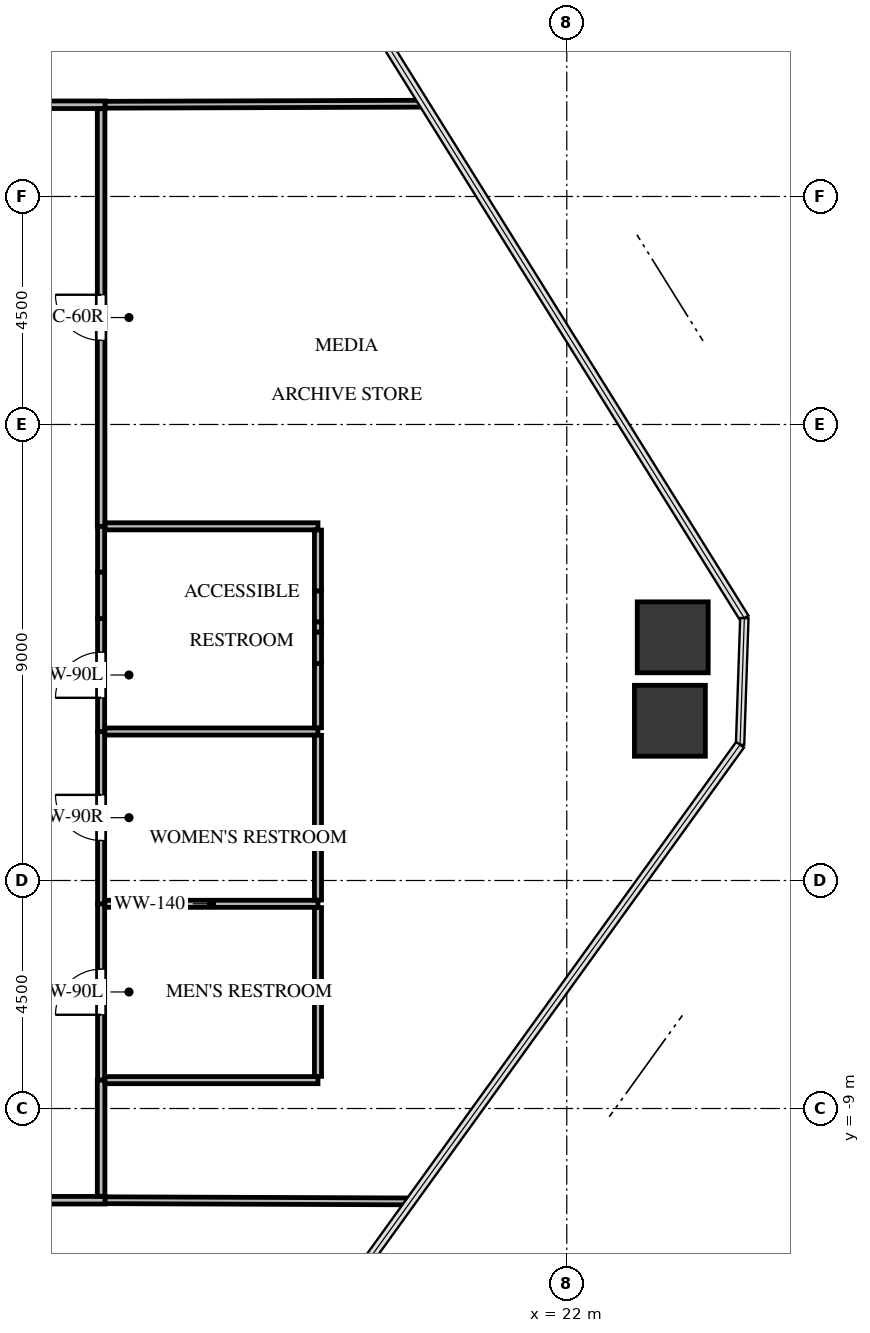
"""IFC4 building model, lengths in metres.
Left out: names, types, materials, properties, quantities, classifications, styles, units other than length and angle.
Written with IfcOpenShell. Run it as: python <this file> out.ifc"""

import sys

from ifc_helpers import new_model, si_unit, direction, frame, frame_2d, origin, origin_2d, place, context, subcontext, project, spatial, rectangle, extrude, source, transform, mapped, element, fill, save


model = new_model("IFC4")
c1 = context("Model", 3, precision=1e-05, world=origin(), true_north=direction((0.0, 1.0)))
c2 = subcontext(c1, "Body", "Model", "MODEL_VIEW")
j1 = project(units=[si_unit("LENGTHUNIT", "METRE"), si_unit("PLANEANGLEUNIT", "RADIAN")], contexts=[c1])
p1 = place(None, origin())
s1 = spatial("IfcSite", under=j1, at=p1, CompositionType="ELEMENT")
p2 = place(p1, origin())
s2 = spatial("IfcBuilding", under=s1, at=p2, CompositionType="ELEMENT")
p3 = place(p2, frame((0.0, 0.0, 35.7)))
s3 = spatial("IfcBuildingStorey", under=s2, at=p3, CompositionType="ELEMENT", Elevation=35.7)
m1 = source(origin(), c2, "Body", "SweptSolid", [
    extrude(rectangle(XDim=1.4, YDim=1.4, at=origin_2d()), origin(), (0.0, 0.0, 1.0), 3.3),
])
for number, where, z_axis, x_axis in (
    (1, (24.091, 0.3, -0.24), (0.0, 0.0, 1.0), (1.0, 0.0, 0.0)),
    (2, (24.035, -1.347, -0.24), (0.0, 0.0, 1.0), (1.0, 0.0, 0.0)),
):
    element("IfcColumn", number, at=place(p3, frame(where, z_axis=z_axis, x_axis=x_axis)), inside=s3, PredefinedType="COLUMN", context=c2, shape_type="MappedRepresentation", body=[
        mapped(m1, transform((0.0, 0.0, 0.0), x_axis=(1.0, 0.0, 0.0), y_axis=(0.0, 1.0, 0.0), z_axis=(0.0, 0.0, 1.0), scale=1.0)),
    ])
p4 = place(p3, frame((12.81, -8.44, 0.0), z_axis=(0.0, 0.0, 1.0), x_axis=(0.0, 1.0, 0.0)))
e3 = element("IfcWall", 3, at=p4, inside=s3, PredefinedType="PARTITIONING", context=c2, shape_type="SweptSolid", body=[
    extrude(rectangle(XDim=3.48, YDim=0.14, at=frame_2d((1.74, 0.0))), origin(), (0.0, 0.0, 1.0), 3.045),
])
p5 = place(p4, frame((1.29, 0.0, 0.0)))
e4 = element("IfcOpeningElement", 4, at=p5, cuts=e3, PredefinedType="OPENING", context=c2, shape_type="SweptSolid", body=[
    extrude(rectangle(XDim=0.9, YDim=2.05, at=frame_2d((0.45, 1.025))), frame((0.0, 0.08, 0.0), z_axis=(0.0, -1.0, 0.0), x_axis=(1.0, 0.0, 0.0)), (0.0, 0.0, 1.0), 0.16),
])
p6 = place(p3, frame((12.81, -4.96, 0.0), z_axis=(0.0, 0.0, 1.0), x_axis=(0.0, 1.0, 0.0)))
e5 = element("IfcWall", 5, at=p6, inside=s3, PredefinedType="PARTITIONING", context=c2, shape_type="SweptSolid", body=[
    extrude(rectangle(XDim=3.4, YDim=0.14, at=frame_2d((1.7, 0.0))), origin(), (0.0, 0.0, 1.0), 3.045),
])
p7 = place(p6, frame((1.25, 0.0, 0.0)))
e6 = element("IfcOpeningElement", 6, at=p7, cuts=e5, PredefinedType="OPENING", context=c2, shape_type="SweptSolid", body=[
    extrude(rectangle(XDim=0.9, YDim=2.05, at=frame_2d((0.45, 1.025))), frame((0.0, 0.08, 0.0), z_axis=(0.0, -1.0, 0.0), x_axis=(1.0, 0.0, 0.0)), (0.0, 0.0, 1.0), 0.16),
])
p8 = place(p3, frame((12.81, -1.56, 0.0), z_axis=(0.0, 0.0, 1.0), x_axis=(0.0, 1.0, 0.0)))
e7 = element("IfcWall", 7, at=p8, inside=s3, PredefinedType="PARTITIONING", context=c2, shape_type="SweptSolid", body=[
    extrude(rectangle(XDim=2.231, YDim=0.14, at=frame_2d((1.116, 0.0))), origin(), (0.0, 0.0, 1.0), 3.045),
])
p9 = place(p8, frame((0.666, 0.0, 0.0)))
e8 = element("IfcOpeningElement", 8, at=p9, cuts=e7, PredefinedType="OPENING", context=c2, shape_type="SweptSolid", body=[
    extrude(rectangle(XDim=0.9, YDim=2.05, at=frame_2d((0.45, 1.025))), frame((0.0, 0.08, 0.0), z_axis=(0.0, -1.0, 0.0), x_axis=(1.0, 0.0, 0.0)), (0.0, 0.0, 1.0), 0.16),
])
p10 = place(p3, frame((12.81, 1.585, 0.0), z_axis=(0.0, 0.0, 1.0), x_axis=(0.0, 1.0, 0.0)))
e9 = element("IfcWall", 9, at=p10, inside=s3, PredefinedType="PARTITIONING", context=c2, shape_type="SweptSolid", body=[
    extrude(rectangle(XDim=0.905, YDim=0.14, at=frame_2d((0.453, 0.0))), origin(), (0.0, 0.0, 1.0), 3.045),
])
p11 = place(p3, frame((12.81, 0.671, 0.0), z_axis=(0.0, 0.0, 1.0), x_axis=(0.0, 1.0, 0.0)))
e10 = element("IfcWall", 10, at=p11, inside=s3, PredefinedType="PARTITIONING", context=c2, shape_type="SweptSolid", body=[
    extrude(rectangle(XDim=0.914, YDim=0.14, at=frame_2d((0.457, 0.0))), origin(), (0.0, 0.0, 1.0), 2.13),
])
p12 = place(p3, frame((12.89, 10.81, 0.0), z_axis=(0.0, 0.0, 1.0), x_axis=(-1.0, 0.0, 0.0)))
e11 = element("IfcWall", 11, at=p12, inside=s3, PredefinedType="PARTITIONING", context=c2, shape_type="SweptSolid", body=[
    extrude(rectangle(XDim=1.847, YDim=0.15, at=frame_2d((0.924, 0.0))), origin(), (0.0, 0.0, 1.0), 3.045),
])
p13 = place(p3, frame((5.817, -10.81, 0.0), z_axis=(0.0, 0.0, 1.0), x_axis=(1.0, 0.0, 0.0)))
e12 = element("IfcWall", 12, at=p13, inside=s3, PredefinedType="PARTITIONING", context=c2, shape_type="SweptSolid", body=[
    extrude(rectangle(XDim=7.073, YDim=0.15, at=frame_2d((3.536, 0.0))), origin(), (0.0, 0.0, 1.0), 2.13),
])
p14 = place(p3, frame((12.81, 2.49, 0.0), z_axis=(0.0, 0.0, 1.0), x_axis=(0.0, 1.0, 0.0)))
e13 = element("IfcWall", 13, at=p14, inside=s3, PredefinedType="PARTITIONING", context=c2, shape_type="SweptSolid", body=[
    extrude(rectangle(XDim=8.241, YDim=0.15, at=frame_2d((4.121, 0.0))), origin(), (0.0, 0.0, 1.0), 3.045),
])
p15 = place(p14, frame((3.67, 0.0, 0.0)))
e14 = element("IfcOpeningElement", 14, at=p15, cuts=e13, PredefinedType="OPENING", context=c2, shape_type="SweptSolid", body=[
    extrude(rectangle(XDim=0.9, YDim=2.05, at=frame_2d((0.45, 1.025))), frame((0.0, 0.085, 0.0), z_axis=(0.0, -1.0, 0.0), x_axis=(1.0, 0.0, 0.0)), (0.0, 0.0, 1.0), 0.17),
])
p16 = place(p3, frame((12.81, -10.731, 0.0), z_axis=(0.0, 0.0, 1.0), x_axis=(0.0, 1.0, 0.0)))
e15 = element("IfcWall", 15, at=p16, inside=s3, PredefinedType="PARTITIONING", context=c2, shape_type="SweptSolid", body=[
    extrude(rectangle(XDim=2.291, YDim=0.15, at=frame_2d((1.146, 0.0))), origin(), (0.0, 0.0, 1.0), 3.045),
])
p17 = place(p3, frame((12.884, -4.96, 0.0), z_axis=(0.0, 0.0, 1.0), x_axis=(1.0, 0.0, 0.0)))
e16 = element("IfcWall", 16, at=p17, inside=s3, PredefinedType="PARTITIONING", context=c2, shape_type="SweptSolid", body=[
    extrude(rectangle(XDim=4.206, YDim=0.14, at=frame_2d((2.103, 0.0))), origin(), (0.0, 0.0, 1.0), 3.045),
])
p18 = place(p3, frame((17.09, -8.44, 0.0), z_axis=(0.0, 0.0, 1.0), x_axis=(-1.0, 0.0, 0.0)))
e17 = element("IfcWall", 17, at=p18, inside=s3, PredefinedType="PARTITIONING", context=c2, shape_type="SweptSolid", body=[
    extrude(rectangle(XDim=4.201, YDim=0.14, at=frame_2d((2.101, 0.0))), origin(), (0.0, 0.0, 1.0), 3.045),
])
p19 = place(p3, frame((17.09, -5.034, 0.0), z_axis=(0.0, 0.0, 1.0), x_axis=(0.0, -1.0, 0.0)))
e18 = element("IfcWall", 18, at=p19, inside=s3, PredefinedType="PARTITIONING", context=c2, shape_type="SweptSolid", body=[
    extrude(rectangle(XDim=3.332, YDim=0.14, at=frame_2d((1.666, 0.0))), origin(), (0.0, 0.0, 1.0), 3.045),
])
p20 = place(p3, frame((12.884, -1.56, 0.0), z_axis=(0.0, 0.0, 1.0), x_axis=(1.0, 0.0, 0.0)))
e19 = element("IfcWall", 19, at=p20, inside=s3, PredefinedType="PARTITIONING", context=c2, shape_type="SweptSolid", body=[
    extrude(rectangle(XDim=4.206, YDim=0.14, at=frame_2d((2.103, 0.0))), origin(), (0.0, 0.0, 1.0), 3.045),
])
p21 = place(p3, frame((17.09, -1.634, 0.0), z_axis=(0.0, 0.0, 1.0), x_axis=(0.0, -1.0, 0.0)))
e20 = element("IfcWall", 20, at=p21, inside=s3, PredefinedType="PARTITIONING", context=c2, shape_type="SweptSolid", body=[
    extrude(rectangle(XDim=3.252, YDim=0.14, at=frame_2d((1.626, 0.0))), origin(), (0.0, 0.0, 1.0), 3.045),
])
p22 = place(p3, frame((12.889, 2.49, 0.0), z_axis=(0.0, 0.0, 1.0), x_axis=(1.0, 0.0, 0.0)))
e21 = element("IfcWall", 21, at=p22, inside=s3, PredefinedType="PARTITIONING", context=c2, shape_type="SweptSolid", body=[
    extrude(rectangle(XDim=4.201, YDim=0.14, at=frame_2d((2.101, 0.0))), origin(), (0.0, 0.0, 1.0), 3.045),
])
p23 = place(p3, frame((17.09, 2.416, 0.0), z_axis=(0.0, 0.0, 1.0), x_axis=(0.0, -1.0, 0.0)))
e22 = element("IfcWall", 22, at=p23, inside=s3, PredefinedType="PARTITIONING", context=c2, shape_type="SweptSolid", body=[
    extrude(rectangle(XDim=1.204, YDim=0.14, at=frame_2d((0.602, 0.0))), origin(), (0.0, 0.0, 1.0), 3.045),
])
p24 = place(p3, frame((17.09, 0.606, 0.0), z_axis=(0.0, 0.0, 1.0), x_axis=(0.0, -1.0, 0.0)))
e23 = element("IfcWall", 23, at=p24, inside=s3, PredefinedType="PARTITIONING", context=c2, shape_type="SweptSolid", body=[
    extrude(rectangle(XDim=0.205, YDim=0.14, at=frame_2d((0.103, 0.0))), origin(), (0.0, 0.0, 1.0), 3.045),
])
p25 = place(p3, frame((17.09, -0.216, 0.0), z_axis=(0.0, 0.0, 1.0), x_axis=(0.0, -1.0, 0.0)))
e24 = element("IfcWall", 24, at=p25, inside=s3, PredefinedType="PARTITIONING", context=c2, shape_type="SweptSolid", body=[
    extrude(rectangle(XDim=1.27, YDim=0.14, at=frame_2d((0.635, 0.0))), origin(), (0.0, 0.0, 1.0), 3.045),
])
p26 = place(p3, frame((17.09, 1.212, 0.0), z_axis=(0.0, 0.0, 1.0), x_axis=(0.0, -1.0, 0.0)))
e25 = element("IfcWall", 25, at=p26, inside=s3, PredefinedType="PARTITIONING", context=c2, shape_type="SweptSolid", body=[
    extrude(rectangle(XDim=0.606, YDim=0.14, at=frame_2d((0.303, 0.0))), origin(), (0.0, 0.0, 1.0), 2.13),
])
p27 = place(p3, frame((17.09, 0.401, 0.0), z_axis=(0.0, 0.0, 1.0), x_axis=(0.0, -1.0, 0.0)))
e26 = element("IfcWall", 26, at=p27, inside=s3, PredefinedType="PARTITIONING", context=c2, shape_type="SweptSolid", body=[
    extrude(rectangle(XDim=0.617, YDim=0.14, at=frame_2d((0.309, 0.0))), origin(), (0.0, 0.0, 1.0), 2.13),
])
p28 = place(p3, frame((19.182, 10.831, 0.0), z_axis=(0.0, 0.0, 1.0), x_axis=(-0.999994432845, -0.003336806783, 0.0)))
e27 = element("IfcWall", 27, at=p28, inside=s3, PredefinedType="PARTITIONING", context=c2, shape_type="SweptSolid", body=[
    extrude(rectangle(XDim=6.292, YDim=0.135, at=frame_2d((3.146, 0.0))), origin(), (0.0, 0.0, 1.0), 2.38),
])
p29 = place(p3, frame((12.89, -10.81, 0.0), z_axis=(0.0, 0.0, 1.0), x_axis=(0.999992607823, -0.003845035728, 0.0)))
e28 = element("IfcWall", 28, at=p29, inside=s3, PredefinedType="PARTITIONING", context=c2, shape_type="SweptSolid", body=[
    extrude(rectangle(XDim=6.032, YDim=0.135, at=frame_2d((3.016, 0.0))), origin(), (0.0, 0.0, 1.0), 2.38),
])
m2 = source(origin(), c2, "Body", "SweptSolid", [
    extrude(rectangle(XDim=0.9, YDim=2.05, at=frame_2d((0.45, 1.025))), frame((0.0, 0.025, 0.0), z_axis=(0.0, -1.0, 0.0), x_axis=(1.0, 0.0, 0.0)), (0.0, 0.0, 1.0), 0.05),
])
p30 = place(p5, origin())
e29 = element("IfcDoor", 29, at=p30, inside=s3, OperationType="SINGLE_SWING_LEFT", PredefinedType="DOOR", context=c2, shape_type="MappedRepresentation", body=[
    mapped(m2, transform((0.0, 0.0, 0.0), x_axis=(1.0, 0.0, 0.0), y_axis=(0.0, 1.0, 0.0), z_axis=(0.0, 0.0, 1.0), scale=1.0)),
])
fill(e4, e29)
m3 = source(origin(), c2, "Body", "SweptSolid", [
    extrude(rectangle(XDim=0.9, YDim=2.05, at=frame_2d((0.45, 1.025))), frame((0.0, 0.025, 0.0), z_axis=(0.0, -1.0, 0.0), x_axis=(1.0, 0.0, 0.0)), (0.0, 0.0, 1.0), 0.05),
])
p31 = place(p7, origin())
e30 = element("IfcDoor", 30, at=p31, inside=s3, OperationType="SINGLE_SWING_RIGHT", PredefinedType="DOOR", context=c2, shape_type="MappedRepresentation", body=[
    mapped(m3, transform((0.0, 0.0, 0.0), x_axis=(1.0, 0.0, 0.0), y_axis=(0.0, 1.0, 0.0), z_axis=(0.0, 0.0, 1.0), scale=1.0)),
])
fill(e6, e30)
p32 = place(p9, origin())
e31 = element("IfcDoor", 31, at=p32, inside=s3, OperationType="SINGLE_SWING_LEFT", PredefinedType="DOOR", context=c2, shape_type="MappedRepresentation", body=[
    mapped(m2, transform((0.0, 0.0, 0.0), x_axis=(1.0, 0.0, 0.0), y_axis=(0.0, 1.0, 0.0), z_axis=(0.0, 0.0, 1.0), scale=1.0)),
])
fill(e8, e31)
m4 = source(origin(), c2, "Body", "SweptSolid", [
    extrude(rectangle(XDim=0.9, YDim=2.05, at=frame_2d((0.45, 1.025))), frame((0.0, 0.025, 0.0), z_axis=(0.0, -1.0, 0.0), x_axis=(1.0, 0.0, 0.0)), (0.0, 0.0, 1.0), 0.05),
])
p33 = place(p15, origin())
e32 = element("IfcDoor", 32, at=p33, inside=s3, OperationType="SINGLE_SWING_RIGHT", PredefinedType="DOOR", context=c2, shape_type="MappedRepresentation", body=[
    mapped(m4, transform((0.0, 0.0, 0.0), x_axis=(1.0, 0.0, 0.0), y_axis=(0.0, 1.0, 0.0), z_axis=(0.0, 0.0, 1.0), scale=1.0)),
])
fill(e14, e32)
save(model, sys.argv[1])
